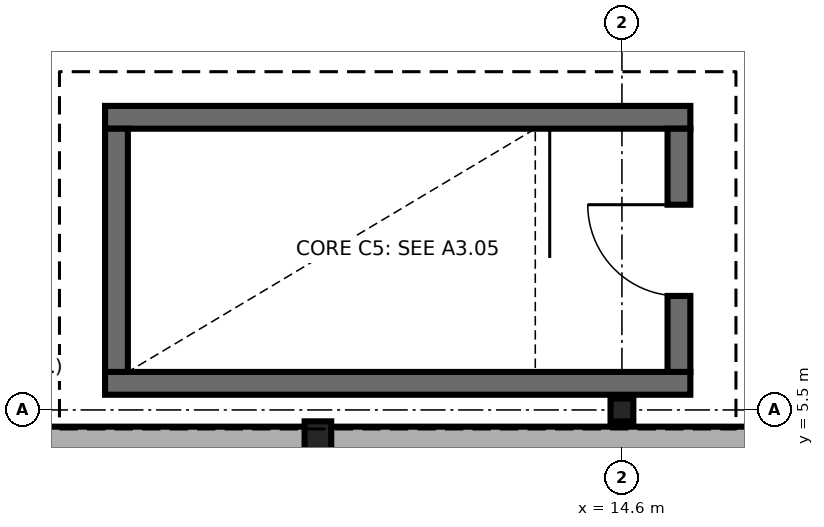
"""IFC4 building model, lengths in metres.
Left out: names, types, materials, properties, quantities, classifications, styles, units other than length and angle.
Written with IfcOpenShell. Run it as: python <this file> out.ifc"""

import sys

from ifc_helpers import new_model, si_unit, direction, frame, frame_2d, origin, origin_2d, place, context, subcontext, project, spatial, rectangle, i_section, extrude, element, fill, save


model = new_model("IFC4")
c1 = context("Model", 3, precision=1e-05, world=origin(), true_north=direction((0.0, 1.0)))
c2 = subcontext(c1, "Body", "Model", "MODEL_VIEW")
j1 = project(units=[si_unit("LENGTHUNIT", "METRE"), si_unit("PLANEANGLEUNIT", "RADIAN")], contexts=[c1])
p1 = place(None, origin())
s1 = spatial("IfcSite", under=j1, at=p1, CompositionType="ELEMENT")
p2 = place(p1, origin())
s2 = spatial("IfcBuilding", under=s1, at=p2, CompositionType="ELEMENT")
p3 = place(p2, frame((0.0, 0.0, 9.3)))
s3 = spatial("IfcBuildingStorey", under=s2, at=p3, CompositionType="ELEMENT", Elevation=9.3)
p4 = place(p3, frame((10.6, 5.05, 0.0), z_axis=(0.0, 0.0, 1.0), x_axis=(1.0, 0.0, 0.0)))
e1 = element("IfcColumn", 1, at=p4, inside=s3, PredefinedType="PILASTER", context=c2, shape_type="SweptSolid", body=[
    extrude(rectangle(XDim=0.35, YDim=0.6, at=origin_2d()), origin(), (0.0, 0.0, 1.0), 4.5),
])
p5 = place(p3, frame((14.6, 5.5, 0.0), z_axis=(0.0, 0.0, 1.0), x_axis=(1.0, 0.0, 0.0)))
e2 = element("IfcColumn", 2, at=p5, inside=s3, PredefinedType="COLUMN", context=c2, shape_type="SweptSolid", body=[
    extrude(i_section(OverallWidth=0.3, OverallDepth=0.3, WebThickness=0.011, FlangeThickness=0.019, FilletRadius=0.027, at=origin_2d()), origin(), (0.0, 0.0, 1.0), 4.5),
])
for number, where, z_axis, x_axis in (
    (3, (7.8, 5.85, 0.0), (0.0, 0.0, 1.0), (1.0, 0.0, 0.0)),
    (4, (15.5, 9.35, 0.0), (0.0, 0.0, 1.0), (-1.0, 0.0, 0.0)),
):
    element("IfcWall", number, at=place(p3, frame(where, z_axis=z_axis, x_axis=x_axis)), inside=s3, PredefinedType="SHEAR", context=c2, shape_type="SweptSolid", body=[
        extrude(rectangle(XDim=7.7, YDim=0.3, at=frame_2d((3.85, 0.0))), origin(), (0.0, 0.0, 1.0), 4.5),
    ])
p6 = place(p3, frame((7.95, 9.2, 0.0), z_axis=(0.0, 0.0, 1.0), x_axis=(0.0, -1.0, 0.0)))
e5 = element("IfcWall", 5, at=p6, inside=s3, PredefinedType="SHEAR", context=c2, shape_type="SweptSolid", body=[
    extrude(rectangle(XDim=3.2, YDim=0.3, at=frame_2d((1.6, 0.0))), origin(), (0.0, 0.0, 1.0), 4.5),
])
p7 = place(p3, frame((15.35, 6.0, 0.0), z_axis=(0.0, 0.0, 1.0), x_axis=(0.0, 1.0, 0.0)))
e6 = element("IfcWall", 6, at=p7, inside=s3, PredefinedType="SHEAR", context=c2, shape_type="SweptSolid", body=[
    extrude(rectangle(XDim=3.2, YDim=0.3, at=frame_2d((1.6, 0.0))), origin(), (0.0, 0.0, 1.0), 4.5),
])
p8 = place(p7, frame((1.0, 0.0, 0.0)))
e7 = element("IfcOpeningElement", 7, at=p8, cuts=e6, PredefinedType="OPENING", context=c2, shape_type="SweptSolid", body=[
    extrude(rectangle(XDim=1.2, YDim=2.15, at=frame_2d((0.6, 1.075))), frame((0.0, 0.16, 0.0), z_axis=(0.0, -1.0, 0.0), x_axis=(1.0, 0.0, 0.0)), (0.0, 0.0, 1.0), 0.32),
])
p9 = place(p3, frame((5.962, 5.09, 0.0), z_axis=(0.0, 0.0, 1.0), x_axis=(1.0, 0.0, 0.0)))
e8 = element("IfcWall", 8, at=p9, inside=s3, PredefinedType="SOLIDWALL", context=c2, shape_type="SweptSolid", body=[
    extrude(rectangle(XDim=48.176, YDim=0.38, at=frame_2d((24.088, 0.0))), origin(), (0.0, 0.0, 1.0), 4.25),
])
p10 = place(p9, frame((10.614, 0.0, 0.9)))
e9 = element("IfcOpeningElement", 9, at=p10, cuts=e8, PredefinedType="OPENING", context=c2, shape_type="SweptSolid", body=[
    extrude(rectangle(XDim=1.2, YDim=2.4, at=frame_2d((0.6, 1.2))), frame((0.0, 0.2, 0.0), z_axis=(0.0, -1.0, 0.0), x_axis=(1.0, 0.0, 0.0)), (0.0, 0.0, 1.0), 0.4),
])
p11 = place(p9, frame((13.458, 0.0, 0.9)))
e10 = element("IfcOpeningElement", 10, at=p11, cuts=e8, PredefinedType="OPENING", context=c2, shape_type="SweptSolid", body=[
    extrude(rectangle(XDim=1.2, YDim=1.8, at=frame_2d((0.6, 0.9))), frame((0.0, 0.2, 0.0), z_axis=(0.0, -1.0, 0.0), x_axis=(1.0, 0.0, 0.0)), (0.0, 0.0, 1.0), 0.4),
])
p12 = place(p9, frame((29.738, 0.0, 0.9)))
e11 = element("IfcOpeningElement", 11, at=p12, cuts=e8, PredefinedType="OPENING", context=c2, shape_type="SweptSolid", body=[
    extrude(rectangle(XDim=1.8, YDim=2.1, at=frame_2d((0.9, 1.05))), frame((0.0, 0.2, 0.0), z_axis=(0.0, -1.0, 0.0), x_axis=(1.0, 0.0, 0.0)), (0.0, 0.0, 1.0), 0.4),
])
p13 = place(p9, frame((34.188, 0.0, 0.9)))
e12 = element("IfcOpeningElement", 12, at=p13, cuts=e8, PredefinedType="OPENING", context=c2, shape_type="SweptSolid", body=[
    extrude(rectangle(XDim=0.9, YDim=1.4, at=frame_2d((0.45, 0.7))), frame((0.0, 0.2, 0.0), z_axis=(0.0, -1.0, 0.0), x_axis=(1.0, 0.0, 0.0)), (0.0, 0.0, 1.0), 0.4),
])
p14 = place(p9, frame((37.258, 0.0, 0.9)))
e13 = element("IfcOpeningElement", 13, at=p14, cuts=e8, PredefinedType="OPENING", context=c2, shape_type="SweptSolid", body=[
    extrude(rectangle(XDim=0.9, YDim=1.8, at=frame_2d((0.45, 0.9))), frame((0.0, 0.2, 0.0), z_axis=(0.0, -1.0, 0.0), x_axis=(1.0, 0.0, 0.0)), (0.0, 0.0, 1.0), 0.4),
])
p15 = place(p9, frame((39.018, 0.0, 0.9)))
e14 = element("IfcOpeningElement", 14, at=p15, cuts=e8, PredefinedType="OPENING", context=c2, shape_type="SweptSolid", body=[
    extrude(rectangle(XDim=0.9, YDim=1.8, at=frame_2d((0.45, 0.9))), frame((0.0, 0.2, 0.0), z_axis=(0.0, -1.0, 0.0), x_axis=(1.0, 0.0, 0.0)), (0.0, 0.0, 1.0), 0.4),
])
p16 = place(p9, frame((41.538, 0.0, 0.9)))
e15 = element("IfcOpeningElement", 15, at=p16, cuts=e8, PredefinedType="OPENING", context=c2, shape_type="SweptSolid", body=[
    extrude(rectangle(XDim=1.2, YDim=1.8, at=frame_2d((0.6, 0.9))), frame((0.0, 0.2, 0.0), z_axis=(0.0, -1.0, 0.0), x_axis=(1.0, 0.0, 0.0)), (0.0, 0.0, 1.0), 0.4),
])
p17 = place(p9, frame((44.438, 0.0, 0.9)))
e16 = element("IfcOpeningElement", 16, at=p17, cuts=e8, PredefinedType="OPENING", context=c2, shape_type="SweptSolid", body=[
    extrude(rectangle(XDim=1.4, YDim=1.65, at=frame_2d((0.7, 0.825))), frame((0.0, 0.2, 0.0), z_axis=(0.0, -1.0, 0.0), x_axis=(1.0, 0.0, 0.0)), (0.0, 0.0, 1.0), 0.4),
])
p18 = place(p8, origin())
e17 = element("IfcDoor", 17, at=p18, inside=s3, OperationType="SINGLE_SWING_RIGHT", PredefinedType="DOOR", context=c2, shape_type="SweptSolid", body=[
    extrude(rectangle(XDim=1.2, YDim=2.15, at=frame_2d((0.6, 1.075))), frame((0.0, 0.025, 0.0), z_axis=(0.0, -1.0, 0.0), x_axis=(1.0, 0.0, 0.0)), (0.0, 0.0, 1.0), 0.05),
])
fill(e7, e17)
save(model, sys.argv[1])
